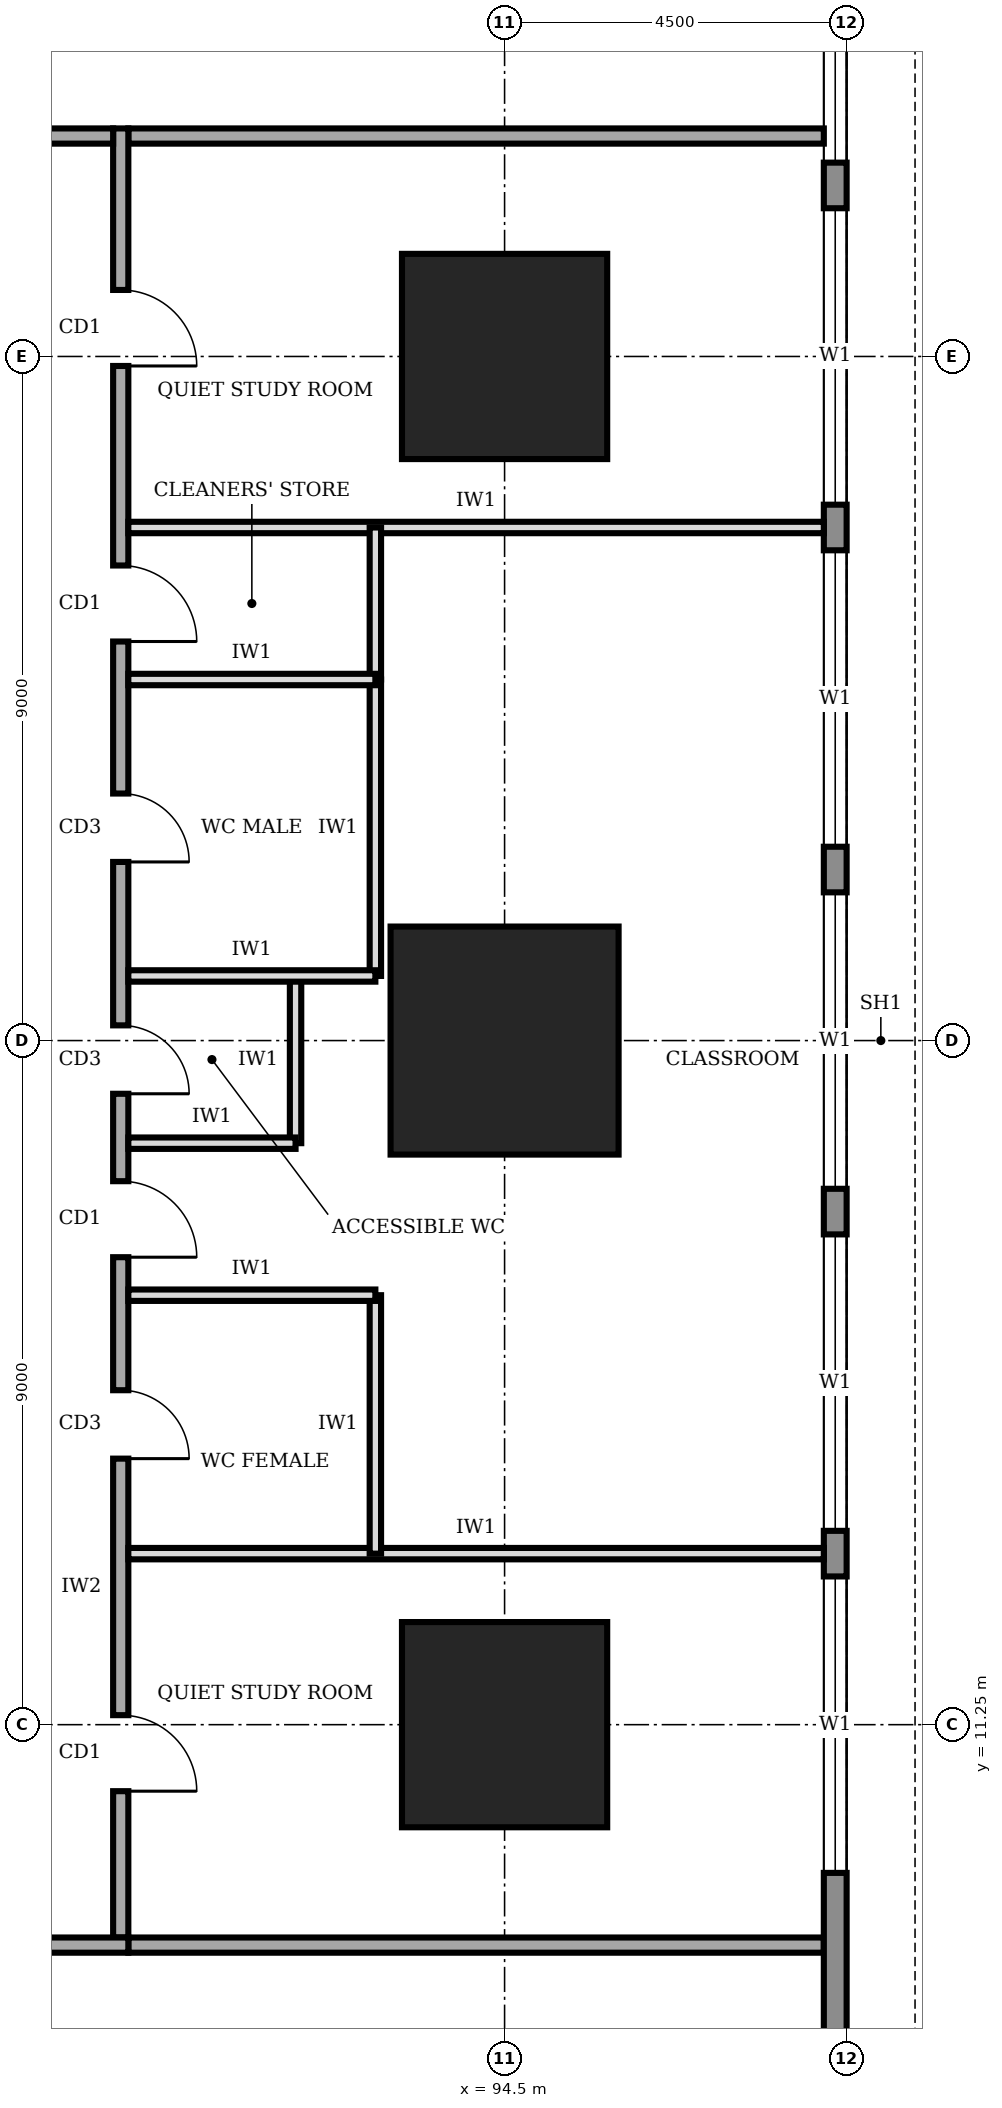
"""IFC4 building model, lengths in metres.
Left out: names, types, materials, properties, quantities, classifications, styles, units other than length and angle.
Written with IfcOpenShell. Run it as: python <this file> out.ifc"""

import sys

from ifc_helpers import new_model, si_unit, direction, frame, frame_2d, origin, origin_2d, place, context, subcontext, project, spatial, rectangle, extrude, element, fill, save


model = new_model("IFC4")
c1 = context("Model", 3, precision=1e-05, world=origin(), true_north=direction((0.0, 1.0)))
c2 = subcontext(c1, "Body", "Model", "MODEL_VIEW")
j1 = project(units=[si_unit("LENGTHUNIT", "METRE"), si_unit("PLANEANGLEUNIT", "RADIAN")], contexts=[c1])
p1 = place(None, origin())
s1 = spatial("IfcSite", under=j1, at=p1, CompositionType="ELEMENT")
p2 = place(p1, origin())
s2 = spatial("IfcBuilding", under=s1, at=p2, CompositionType="ELEMENT")
p3 = place(p2, frame((0.0, 0.0, 41.0)))
s3 = spatial("IfcBuildingStorey", under=s2, at=p3, CompositionType="ELEMENT", Elevation=41.0)
p4 = place(p3, frame((94.5, 11.25, 0.0), z_axis=(0.0, 0.0, 1.0), x_axis=(1.0, 0.0, 0.0)))
e1 = element("IfcColumn", 1, at=p4, inside=s3, PredefinedType="COLUMN", context=c2, shape_type="SweptSolid", body=[
    extrude(rectangle(XDim=2.7, YDim=2.7, at=origin_2d()), origin(), (0.0, 0.0, 1.0), 4.0),
])
p5 = place(p3, frame((94.5, 20.25, 0.0), z_axis=(0.0, 0.0, 1.0), x_axis=(1.0, 0.0, 0.0)))
e2 = element("IfcColumn", 2, at=p5, inside=s3, PredefinedType="COLUMN", context=c2, shape_type="SweptSolid", body=[
    extrude(rectangle(XDim=3.0, YDim=3.0, at=origin_2d()), origin(), (0.0, 0.0, 1.0), 4.0),
])
p6 = place(p3, frame((94.5, 29.25, 0.0), z_axis=(0.0, 0.0, 1.0), x_axis=(1.0, 0.0, 0.0)))
e3 = element("IfcColumn", 3, at=p6, inside=s3, PredefinedType="COLUMN", context=c2, shape_type="SweptSolid", body=[
    extrude(rectangle(XDim=2.7, YDim=2.7, at=origin_2d()), origin(), (0.0, 0.0, 1.0), 4.0),
])
p7 = place(p3, frame((98.85, 4.52, 0.0), z_axis=(0.0, 0.0, 1.0), x_axis=(0.0, 1.0, 0.0)))
e4 = element("IfcWall", 4, at=p7, inside=s3, PredefinedType="STANDARD", context=c2, shape_type="SweptSolid", body=[
    extrude(rectangle(XDim=31.46, YDim=0.3, at=frame_2d((15.73, 0.0))), origin(), (0.0, 0.0, 1.0), 3.75),
])
p8 = place(p7, frame((4.78, 0.0, 0.9)))
e5 = element("IfcOpeningElement", 5, at=p8, cuts=e4, PredefinedType="OPENING", context=c2, shape_type="SweptSolid", body=[
    extrude(rectangle(XDim=3.9, YDim=2.2, at=frame_2d((1.95, 1.1))), frame((0.0, 0.16, 0.0), z_axis=(0.0, -1.0, 0.0), x_axis=(1.0, 0.0, 0.0)), (0.0, 0.0, 1.0), 0.32),
])
p9 = place(p7, frame((9.28, 0.0, 0.9)))
e6 = element("IfcOpeningElement", 6, at=p9, cuts=e4, PredefinedType="OPENING", context=c2, shape_type="SweptSolid", body=[
    extrude(rectangle(XDim=3.9, YDim=2.2, at=frame_2d((1.95, 1.1))), frame((0.0, 0.16, 0.0), z_axis=(0.0, -1.0, 0.0), x_axis=(1.0, 0.0, 0.0)), (0.0, 0.0, 1.0), 0.32),
])
p10 = place(p7, frame((13.78, 0.0, 0.9)))
e7 = element("IfcOpeningElement", 7, at=p10, cuts=e4, PredefinedType="OPENING", context=c2, shape_type="SweptSolid", body=[
    extrude(rectangle(XDim=3.9, YDim=2.2, at=frame_2d((1.95, 1.1))), frame((0.0, 0.16, 0.0), z_axis=(0.0, -1.0, 0.0), x_axis=(1.0, 0.0, 0.0)), (0.0, 0.0, 1.0), 0.32),
])
p11 = place(p7, frame((18.28, 0.0, 0.9)))
e8 = element("IfcOpeningElement", 8, at=p11, cuts=e4, PredefinedType="OPENING", context=c2, shape_type="SweptSolid", body=[
    extrude(rectangle(XDim=3.9, YDim=2.2, at=frame_2d((1.95, 1.1))), frame((0.0, 0.16, 0.0), z_axis=(0.0, -1.0, 0.0), x_axis=(1.0, 0.0, 0.0)), (0.0, 0.0, 1.0), 0.32),
])
p12 = place(p7, frame((22.78, 0.0, 0.9)))
e9 = element("IfcOpeningElement", 9, at=p12, cuts=e4, PredefinedType="OPENING", context=c2, shape_type="SweptSolid", body=[
    extrude(rectangle(XDim=3.9, YDim=2.2, at=frame_2d((1.95, 1.1))), frame((0.0, 0.16, 0.0), z_axis=(0.0, -1.0, 0.0), x_axis=(1.0, 0.0, 0.0)), (0.0, 0.0, 1.0), 0.32),
])
p13 = place(p7, frame((27.28, 0.0, 0.9)))
e10 = element("IfcOpeningElement", 10, at=p13, cuts=e4, PredefinedType="OPENING", context=c2, shape_type="SweptSolid", body=[
    extrude(rectangle(XDim=3.9, YDim=2.2, at=frame_2d((1.95, 1.1))), frame((0.0, 0.16, 0.0), z_axis=(0.0, -1.0, 0.0), x_axis=(1.0, 0.0, 0.0)), (0.0, 0.0, 1.0), 0.32),
])
p14 = place(p3, frame((72.65, 8.35, 0.0), z_axis=(0.0, 0.0, 1.0), x_axis=(1.0, 0.0, 0.0)))
e11 = element("IfcWall", 11, at=p14, inside=s3, PredefinedType="SOLIDWALL", context=c2, shape_type="SweptSolid", body=[
    extrude(rectangle(XDim=16.9, YDim=0.2, at=frame_2d((8.45, 0.0))), origin(), (0.0, 0.0, 1.0), 3.75),
])
p15 = place(p14, frame((1.325, 0.0, 0.0)))
e12 = element("IfcOpeningElement", 12, at=p15, cuts=e11, PredefinedType="OPENING", context=c2, shape_type="SweptSolid", body=[
    extrude(rectangle(XDim=1.0, YDim=2.1, at=frame_2d((0.5, 1.05))), frame((0.0, 0.11, 0.0), z_axis=(0.0, -1.0, 0.0), x_axis=(1.0, 0.0, 0.0)), (0.0, 0.0, 1.0), 0.22),
])
p16 = place(p14, frame((5.6, 0.0, 0.0)))
e13 = element("IfcOpeningElement", 13, at=p16, cuts=e11, PredefinedType="OPENING", context=c2, shape_type="SweptSolid", body=[
    extrude(rectangle(XDim=1.0, YDim=2.1, at=frame_2d((0.5, 1.05))), frame((0.0, 0.11, 0.0), z_axis=(0.0, -1.0, 0.0), x_axis=(1.0, 0.0, 0.0)), (0.0, 0.0, 1.0), 0.22),
])
p17 = place(p14, frame((11.925, 0.0, 0.0)))
e14 = element("IfcOpeningElement", 14, at=p17, cuts=e11, PredefinedType="OPENING", context=c2, shape_type="SweptSolid", body=[
    extrude(rectangle(XDim=1.4, YDim=2.1, at=frame_2d((0.7, 1.05))), frame((0.0, 0.11, 0.0), z_axis=(0.0, -1.0, 0.0), x_axis=(1.0, 0.0, 0.0)), (0.0, 0.0, 1.0), 0.22),
])
p18 = place(p3, frame((89.45, 8.45, 0.0), z_axis=(0.0, 0.0, 1.0), x_axis=(0.0, 1.0, 0.0)))
e15 = element("IfcWall", 15, at=p18, inside=s3, PredefinedType="SOLIDWALL", context=c2, shape_type="SweptSolid", body=[
    extrude(rectangle(XDim=23.8, YDim=0.2, at=frame_2d((11.9, 0.0))), origin(), (0.0, 0.0, 1.0), 3.75),
])
p19 = place(p18, frame((1.925, 0.0, 0.0)))
e16 = element("IfcOpeningElement", 16, at=p19, cuts=e15, PredefinedType="OPENING", context=c2, shape_type="SweptSolid", body=[
    extrude(rectangle(XDim=1.0, YDim=2.1, at=frame_2d((0.5, 1.05))), frame((0.0, 0.11, 0.0), z_axis=(0.0, -1.0, 0.0), x_axis=(1.0, 0.0, 0.0)), (0.0, 0.0, 1.0), 0.22),
])
p20 = place(p18, frame((6.3, 0.0, 0.0)))
e17 = element("IfcOpeningElement", 17, at=p20, cuts=e15, PredefinedType="OPENING", context=c2, shape_type="SweptSolid", body=[
    extrude(rectangle(XDim=0.9, YDim=2.1, at=frame_2d((0.45, 1.05))), frame((0.0, 0.11, 0.0), z_axis=(0.0, -1.0, 0.0), x_axis=(1.0, 0.0, 0.0)), (0.0, 0.0, 1.0), 0.22),
])
p21 = place(p18, frame((11.1, 0.0, 0.0)))
e18 = element("IfcOpeningElement", 18, at=p21, cuts=e15, PredefinedType="OPENING", context=c2, shape_type="SweptSolid", body=[
    extrude(rectangle(XDim=0.9, YDim=2.1, at=frame_2d((0.45, 1.05))), frame((0.0, 0.11, 0.0), z_axis=(0.0, -1.0, 0.0), x_axis=(1.0, 0.0, 0.0)), (0.0, 0.0, 1.0), 0.22),
])
p22 = place(p18, frame((14.15, 0.0, 0.0)))
e19 = element("IfcOpeningElement", 19, at=p22, cuts=e15, PredefinedType="OPENING", context=c2, shape_type="SweptSolid", body=[
    extrude(rectangle(XDim=0.9, YDim=2.1, at=frame_2d((0.45, 1.05))), frame((0.0, 0.11, 0.0), z_axis=(0.0, -1.0, 0.0), x_axis=(1.0, 0.0, 0.0)), (0.0, 0.0, 1.0), 0.22),
])
p23 = place(p18, frame((17.05, 0.0, 0.0)))
e20 = element("IfcOpeningElement", 20, at=p23, cuts=e15, PredefinedType="OPENING", context=c2, shape_type="SweptSolid", body=[
    extrude(rectangle(XDim=1.0, YDim=2.1, at=frame_2d((0.5, 1.05))), frame((0.0, 0.11, 0.0), z_axis=(0.0, -1.0, 0.0), x_axis=(1.0, 0.0, 0.0)), (0.0, 0.0, 1.0), 0.22),
])
p24 = place(p18, frame((8.95, 0.0, 0.0)))
e21 = element("IfcOpeningElement", 21, at=p24, cuts=e15, PredefinedType="OPENING", context=c2, shape_type="SweptSolid", body=[
    extrude(rectangle(XDim=1.0, YDim=2.1, at=frame_2d((0.5, 1.05))), frame((0.0, 0.11, 0.0), z_axis=(0.0, -1.0, 0.0), x_axis=(1.0, 0.0, 0.0)), (0.0, 0.0, 1.0), 0.22),
])
p25 = place(p18, frame((20.675, 0.0, 0.0)))
e22 = element("IfcOpeningElement", 22, at=p25, cuts=e15, PredefinedType="OPENING", context=c2, shape_type="SweptSolid", body=[
    extrude(rectangle(XDim=1.0, YDim=2.1, at=frame_2d((0.5, 1.05))), frame((0.0, 0.11, 0.0), z_axis=(0.0, -1.0, 0.0), x_axis=(1.0, 0.0, 0.0)), (0.0, 0.0, 1.0), 0.22),
])
p26 = place(p3, frame((89.35, 32.15, 0.0), z_axis=(0.0, 0.0, 1.0), x_axis=(-1.0, 0.0, 0.0)))
e23 = element("IfcWall", 23, at=p26, inside=s3, PredefinedType="SOLIDWALL", context=c2, shape_type="SweptSolid", body=[
    extrude(rectangle(XDim=16.9, YDim=0.2, at=frame_2d((8.45, 0.0))), origin(), (0.0, 0.0, 1.0), 3.75),
])
p27 = place(p26, frame((14.375, 0.0, 0.0)))
e24 = element("IfcOpeningElement", 24, at=p27, cuts=e23, PredefinedType="OPENING", context=c2, shape_type="SweptSolid", body=[
    extrude(rectangle(XDim=1.0, YDim=2.1, at=frame_2d((0.5, 1.05))), frame((0.0, 0.11, 0.0), z_axis=(0.0, -1.0, 0.0), x_axis=(1.0, 0.0, 0.0)), (0.0, 0.0, 1.0), 0.22),
])
p28 = place(p26, frame((7.85, 0.0, 0.0)))
e25 = element("IfcOpeningElement", 25, at=p28, cuts=e23, PredefinedType="OPENING", context=c2, shape_type="SweptSolid", body=[
    extrude(rectangle(XDim=1.0, YDim=2.1, at=frame_2d((0.5, 1.05))), frame((0.0, 0.11, 0.0), z_axis=(0.0, -1.0, 0.0), x_axis=(1.0, 0.0, 0.0)), (0.0, 0.0, 1.0), 0.22),
])
p29 = place(p26, frame((1.325, 0.0, 0.0)))
e26 = element("IfcOpeningElement", 26, at=p29, cuts=e23, PredefinedType="OPENING", context=c2, shape_type="SweptSolid", body=[
    extrude(rectangle(XDim=1.0, YDim=2.1, at=frame_2d((0.5, 1.05))), frame((0.0, 0.11, 0.0), z_axis=(0.0, -1.0, 0.0), x_axis=(1.0, 0.0, 0.0)), (0.0, 0.0, 1.0), 0.22),
])
for number, where, z_axis, x_axis in (
    (27, (89.55, 8.35, 0.0), (0.0, 0.0, 1.0), (1.0, 0.0, 0.0)),
    (28, (89.55, 32.15, 0.0), (0.0, 0.0, 1.0), (1.0, 0.0, 0.0)),
):
    element("IfcWall", number, at=place(p3, frame(where, z_axis=z_axis, x_axis=x_axis)), inside=s3, PredefinedType="SOLIDWALL", context=c2, shape_type="SweptSolid", body=[
        extrude(rectangle(XDim=9.15, YDim=0.2, at=frame_2d((4.575, 0.0))), origin(), (0.0, 0.0, 1.0), 3.75),
    ])
for number, where, z_axis, x_axis in (
    (29, (89.55, 13.5, 0.0), (0.0, 0.0, 1.0), (1.0, 0.0, 0.0)),
    (30, (89.55, 27.0, 0.0), (0.0, 0.0, 1.0), (1.0, 0.0, 0.0)),
):
    element("IfcWall", number, at=place(p3, frame(where, z_axis=z_axis, x_axis=x_axis)), inside=s3, PredefinedType="PARTITIONING", context=c2, shape_type="SweptSolid", body=[
        extrude(rectangle(XDim=9.15, YDim=0.15, at=frame_2d((4.575, 0.0))), origin(), (0.0, 0.0, 1.0), 3.75),
    ])
p30 = place(p3, frame((89.55, 16.9, 0.0), z_axis=(0.0, 0.0, 1.0), x_axis=(1.0, 0.0, 0.0)))
e31 = element("IfcWall", 31, at=p30, inside=s3, PredefinedType="PARTITIONING", context=c2, shape_type="SweptSolid", body=[
    extrude(rectangle(XDim=3.25, YDim=0.15, at=frame_2d((1.625, 0.0))), origin(), (0.0, 0.0, 1.0), 3.75),
])
p31 = place(p3, frame((89.55, 18.9, 0.0), z_axis=(0.0, 0.0, 1.0), x_axis=(1.0, 0.0, 0.0)))
e32 = element("IfcWall", 32, at=p31, inside=s3, PredefinedType="PARTITIONING", context=c2, shape_type="SweptSolid", body=[
    extrude(rectangle(XDim=2.2, YDim=0.15, at=frame_2d((1.1, 0.0))), origin(), (0.0, 0.0, 1.0), 3.75),
])
p32 = place(p3, frame((89.55, 21.1, 0.0), z_axis=(0.0, 0.0, 1.0), x_axis=(1.0, 0.0, 0.0)))
e33 = element("IfcWall", 33, at=p32, inside=s3, PredefinedType="PARTITIONING", context=c2, shape_type="SweptSolid", body=[
    extrude(rectangle(XDim=3.25, YDim=0.15, at=frame_2d((1.625, 0.0))), origin(), (0.0, 0.0, 1.0), 2.85),
])
p33 = place(p3, frame((89.55, 25.0, 0.0), z_axis=(0.0, 0.0, 1.0), x_axis=(1.0, 0.0, 0.0)))
e34 = element("IfcWall", 34, at=p33, inside=s3, PredefinedType="PARTITIONING", context=c2, shape_type="SweptSolid", body=[
    extrude(rectangle(XDim=3.25, YDim=0.15, at=frame_2d((1.625, 0.0))), origin(), (0.0, 0.0, 1.0), 3.75),
])
p34 = place(p3, frame((92.8, 13.5, 0.0), z_axis=(0.0, 0.0, 1.0), x_axis=(0.0, 1.0, 0.0)))
e35 = element("IfcWall", 35, at=p34, inside=s3, PredefinedType="PARTITIONING", context=c2, shape_type="SweptSolid", body=[
    extrude(rectangle(XDim=3.4, YDim=0.15, at=frame_2d((1.7, 0.0))), origin(), (0.0, 0.0, 1.0), 3.75),
])
p35 = place(p3, frame((91.75, 18.9, 0.0), z_axis=(0.0, 0.0, 1.0), x_axis=(0.0, 1.0, 0.0)))
e36 = element("IfcWall", 36, at=p35, inside=s3, PredefinedType="PARTITIONING", context=c2, shape_type="SweptSolid", body=[
    extrude(rectangle(XDim=2.2, YDim=0.15, at=frame_2d((1.1, 0.0))), origin(), (0.0, 0.0, 1.0), 3.75),
])
p36 = place(p3, frame((92.8, 21.1, 0.0), z_axis=(0.0, 0.0, 1.0), x_axis=(0.0, 1.0, 0.0)))
e37 = element("IfcWall", 37, at=p36, inside=s3, PredefinedType="PARTITIONING", context=c2, shape_type="SweptSolid", body=[
    extrude(rectangle(XDim=3.9, YDim=0.15, at=frame_2d((1.95, 0.0))), origin(), (0.0, 0.0, 1.0), 3.75),
])
p37 = place(p3, frame((92.8, 25.0, 0.0), z_axis=(0.0, 0.0, 1.0), x_axis=(0.0, 1.0, 0.0)))
e38 = element("IfcWall", 38, at=p37, inside=s3, PredefinedType="PARTITIONING", context=c2, shape_type="SweptSolid", body=[
    extrude(rectangle(XDim=2.0, YDim=0.15, at=frame_2d((1.0, 0.0))), origin(), (0.0, 0.0, 1.0), 3.75),
])
p38 = place(p8, origin())
e39 = element("IfcWindow", 39, at=p38, inside=s3, PartitioningType="SINGLE_PANEL", PredefinedType="WINDOW", context=c2, shape_type="SweptSolid", body=[
    extrude(rectangle(XDim=3.9, YDim=2.2, at=frame_2d((1.95, 1.1))), frame((0.0, 0.03, 0.0), z_axis=(0.0, -1.0, 0.0), x_axis=(1.0, 0.0, 0.0)), (0.0, 0.0, 1.0), 0.06),
])
fill(e5, e39)
p39 = place(p9, origin())
e40 = element("IfcWindow", 40, at=p39, inside=s3, PartitioningType="SINGLE_PANEL", PredefinedType="WINDOW", context=c2, shape_type="SweptSolid", body=[
    extrude(rectangle(XDim=3.9, YDim=2.2, at=frame_2d((1.95, 1.1))), frame((0.0, 0.03, 0.0), z_axis=(0.0, -1.0, 0.0), x_axis=(1.0, 0.0, 0.0)), (0.0, 0.0, 1.0), 0.06),
])
fill(e6, e40)
p40 = place(p10, origin())
e41 = element("IfcWindow", 41, at=p40, inside=s3, PartitioningType="SINGLE_PANEL", PredefinedType="WINDOW", context=c2, shape_type="SweptSolid", body=[
    extrude(rectangle(XDim=3.9, YDim=2.2, at=frame_2d((1.95, 1.1))), frame((0.0, 0.03, 0.0), z_axis=(0.0, -1.0, 0.0), x_axis=(1.0, 0.0, 0.0)), (0.0, 0.0, 1.0), 0.06),
])
fill(e7, e41)
p41 = place(p11, origin())
e42 = element("IfcWindow", 42, at=p41, inside=s3, PartitioningType="SINGLE_PANEL", PredefinedType="WINDOW", context=c2, shape_type="SweptSolid", body=[
    extrude(rectangle(XDim=3.9, YDim=2.2, at=frame_2d((1.95, 1.1))), frame((0.0, 0.03, 0.0), z_axis=(0.0, -1.0, 0.0), x_axis=(1.0, 0.0, 0.0)), (0.0, 0.0, 1.0), 0.06),
])
fill(e8, e42)
p42 = place(p12, origin())
e43 = element("IfcWindow", 43, at=p42, inside=s3, PartitioningType="SINGLE_PANEL", PredefinedType="WINDOW", context=c2, shape_type="SweptSolid", body=[
    extrude(rectangle(XDim=3.9, YDim=2.2, at=frame_2d((1.95, 1.1))), frame((0.0, 0.03, 0.0), z_axis=(0.0, -1.0, 0.0), x_axis=(1.0, 0.0, 0.0)), (0.0, 0.0, 1.0), 0.06),
])
fill(e9, e43)
p43 = place(p13, origin())
e44 = element("IfcWindow", 44, at=p43, inside=s3, PartitioningType="SINGLE_PANEL", PredefinedType="WINDOW", context=c2, shape_type="SweptSolid", body=[
    extrude(rectangle(XDim=3.9, YDim=2.2, at=frame_2d((1.95, 1.1))), frame((0.0, 0.03, 0.0), z_axis=(0.0, -1.0, 0.0), x_axis=(1.0, 0.0, 0.0)), (0.0, 0.0, 1.0), 0.06),
])
fill(e10, e44)
p44 = place(p19, frame((1.0, 0.0, 0.0), z_axis=(0.0, 0.0, 1.0), x_axis=(-1.0, 0.0, 0.0)))
e45 = element("IfcDoor", 45, at=p44, inside=s3, OperationType="SINGLE_SWING_RIGHT", PredefinedType="DOOR", context=c2, shape_type="SweptSolid", body=[
    extrude(rectangle(XDim=1.0, YDim=2.1, at=frame_2d((0.5, 1.05))), frame((0.0, 0.025, 0.0), z_axis=(0.0, -1.0, 0.0), x_axis=(1.0, 0.0, 0.0)), (0.0, 0.0, 1.0), 0.05),
])
fill(e16, e45)
p45 = place(p20, frame((0.9, 0.0, 0.0), z_axis=(0.0, 0.0, 1.0), x_axis=(-1.0, 0.0, 0.0)))
e46 = element("IfcDoor", 46, at=p45, inside=s3, OperationType="SINGLE_SWING_RIGHT", PredefinedType="DOOR", context=c2, shape_type="SweptSolid", body=[
    extrude(rectangle(XDim=0.9, YDim=2.1, at=frame_2d((0.45, 1.05))), frame((0.0, 0.025, 0.0), z_axis=(0.0, -1.0, 0.0), x_axis=(1.0, 0.0, 0.0)), (0.0, 0.0, 1.0), 0.05),
])
fill(e17, e46)
p46 = place(p21, frame((0.9, 0.0, 0.0), z_axis=(0.0, 0.0, 1.0), x_axis=(-1.0, 0.0, 0.0)))
e47 = element("IfcDoor", 47, at=p46, inside=s3, OperationType="SINGLE_SWING_RIGHT", PredefinedType="DOOR", context=c2, shape_type="SweptSolid", body=[
    extrude(rectangle(XDim=0.9, YDim=2.1, at=frame_2d((0.45, 1.05))), frame((0.0, 0.025, 0.0), z_axis=(0.0, -1.0, 0.0), x_axis=(1.0, 0.0, 0.0)), (0.0, 0.0, 1.0), 0.05),
])
fill(e18, e47)
p47 = place(p22, frame((0.9, 0.0, 0.0), z_axis=(0.0, 0.0, 1.0), x_axis=(-1.0, 0.0, 0.0)))
e48 = element("IfcDoor", 48, at=p47, inside=s3, OperationType="SINGLE_SWING_RIGHT", PredefinedType="DOOR", context=c2, shape_type="SweptSolid", body=[
    extrude(rectangle(XDim=0.9, YDim=2.1, at=frame_2d((0.45, 1.05))), frame((0.0, 0.025, 0.0), z_axis=(0.0, -1.0, 0.0), x_axis=(1.0, 0.0, 0.0)), (0.0, 0.0, 1.0), 0.05),
])
fill(e19, e48)
p48 = place(p23, frame((1.0, 0.0, 0.0), z_axis=(0.0, 0.0, 1.0), x_axis=(-1.0, 0.0, 0.0)))
e49 = element("IfcDoor", 49, at=p48, inside=s3, OperationType="SINGLE_SWING_RIGHT", PredefinedType="DOOR", context=c2, shape_type="SweptSolid", body=[
    extrude(rectangle(XDim=1.0, YDim=2.1, at=frame_2d((0.5, 1.05))), frame((0.0, 0.025, 0.0), z_axis=(0.0, -1.0, 0.0), x_axis=(1.0, 0.0, 0.0)), (0.0, 0.0, 1.0), 0.05),
])
fill(e20, e49)
p49 = place(p24, frame((1.0, 0.0, 0.0), z_axis=(0.0, 0.0, 1.0), x_axis=(-1.0, 0.0, 0.0)))
e50 = element("IfcDoor", 50, at=p49, inside=s3, OperationType="SINGLE_SWING_RIGHT", PredefinedType="DOOR", context=c2, shape_type="SweptSolid", body=[
    extrude(rectangle(XDim=1.0, YDim=2.1, at=frame_2d((0.5, 1.05))), frame((0.0, 0.025, 0.0), z_axis=(0.0, -1.0, 0.0), x_axis=(1.0, 0.0, 0.0)), (0.0, 0.0, 1.0), 0.05),
])
fill(e21, e50)
p50 = place(p25, frame((1.0, 0.0, 0.0), z_axis=(0.0, 0.0, 1.0), x_axis=(-1.0, 0.0, 0.0)))
e51 = element("IfcDoor", 51, at=p50, inside=s3, OperationType="SINGLE_SWING_RIGHT", PredefinedType="DOOR", context=c2, shape_type="SweptSolid", body=[
    extrude(rectangle(XDim=1.0, YDim=2.1, at=frame_2d((0.5, 1.05))), frame((0.0, 0.025, 0.0), z_axis=(0.0, -1.0, 0.0), x_axis=(1.0, 0.0, 0.0)), (0.0, 0.0, 1.0), 0.05),
])
fill(e22, e51)
save(model, sys.argv[1])
